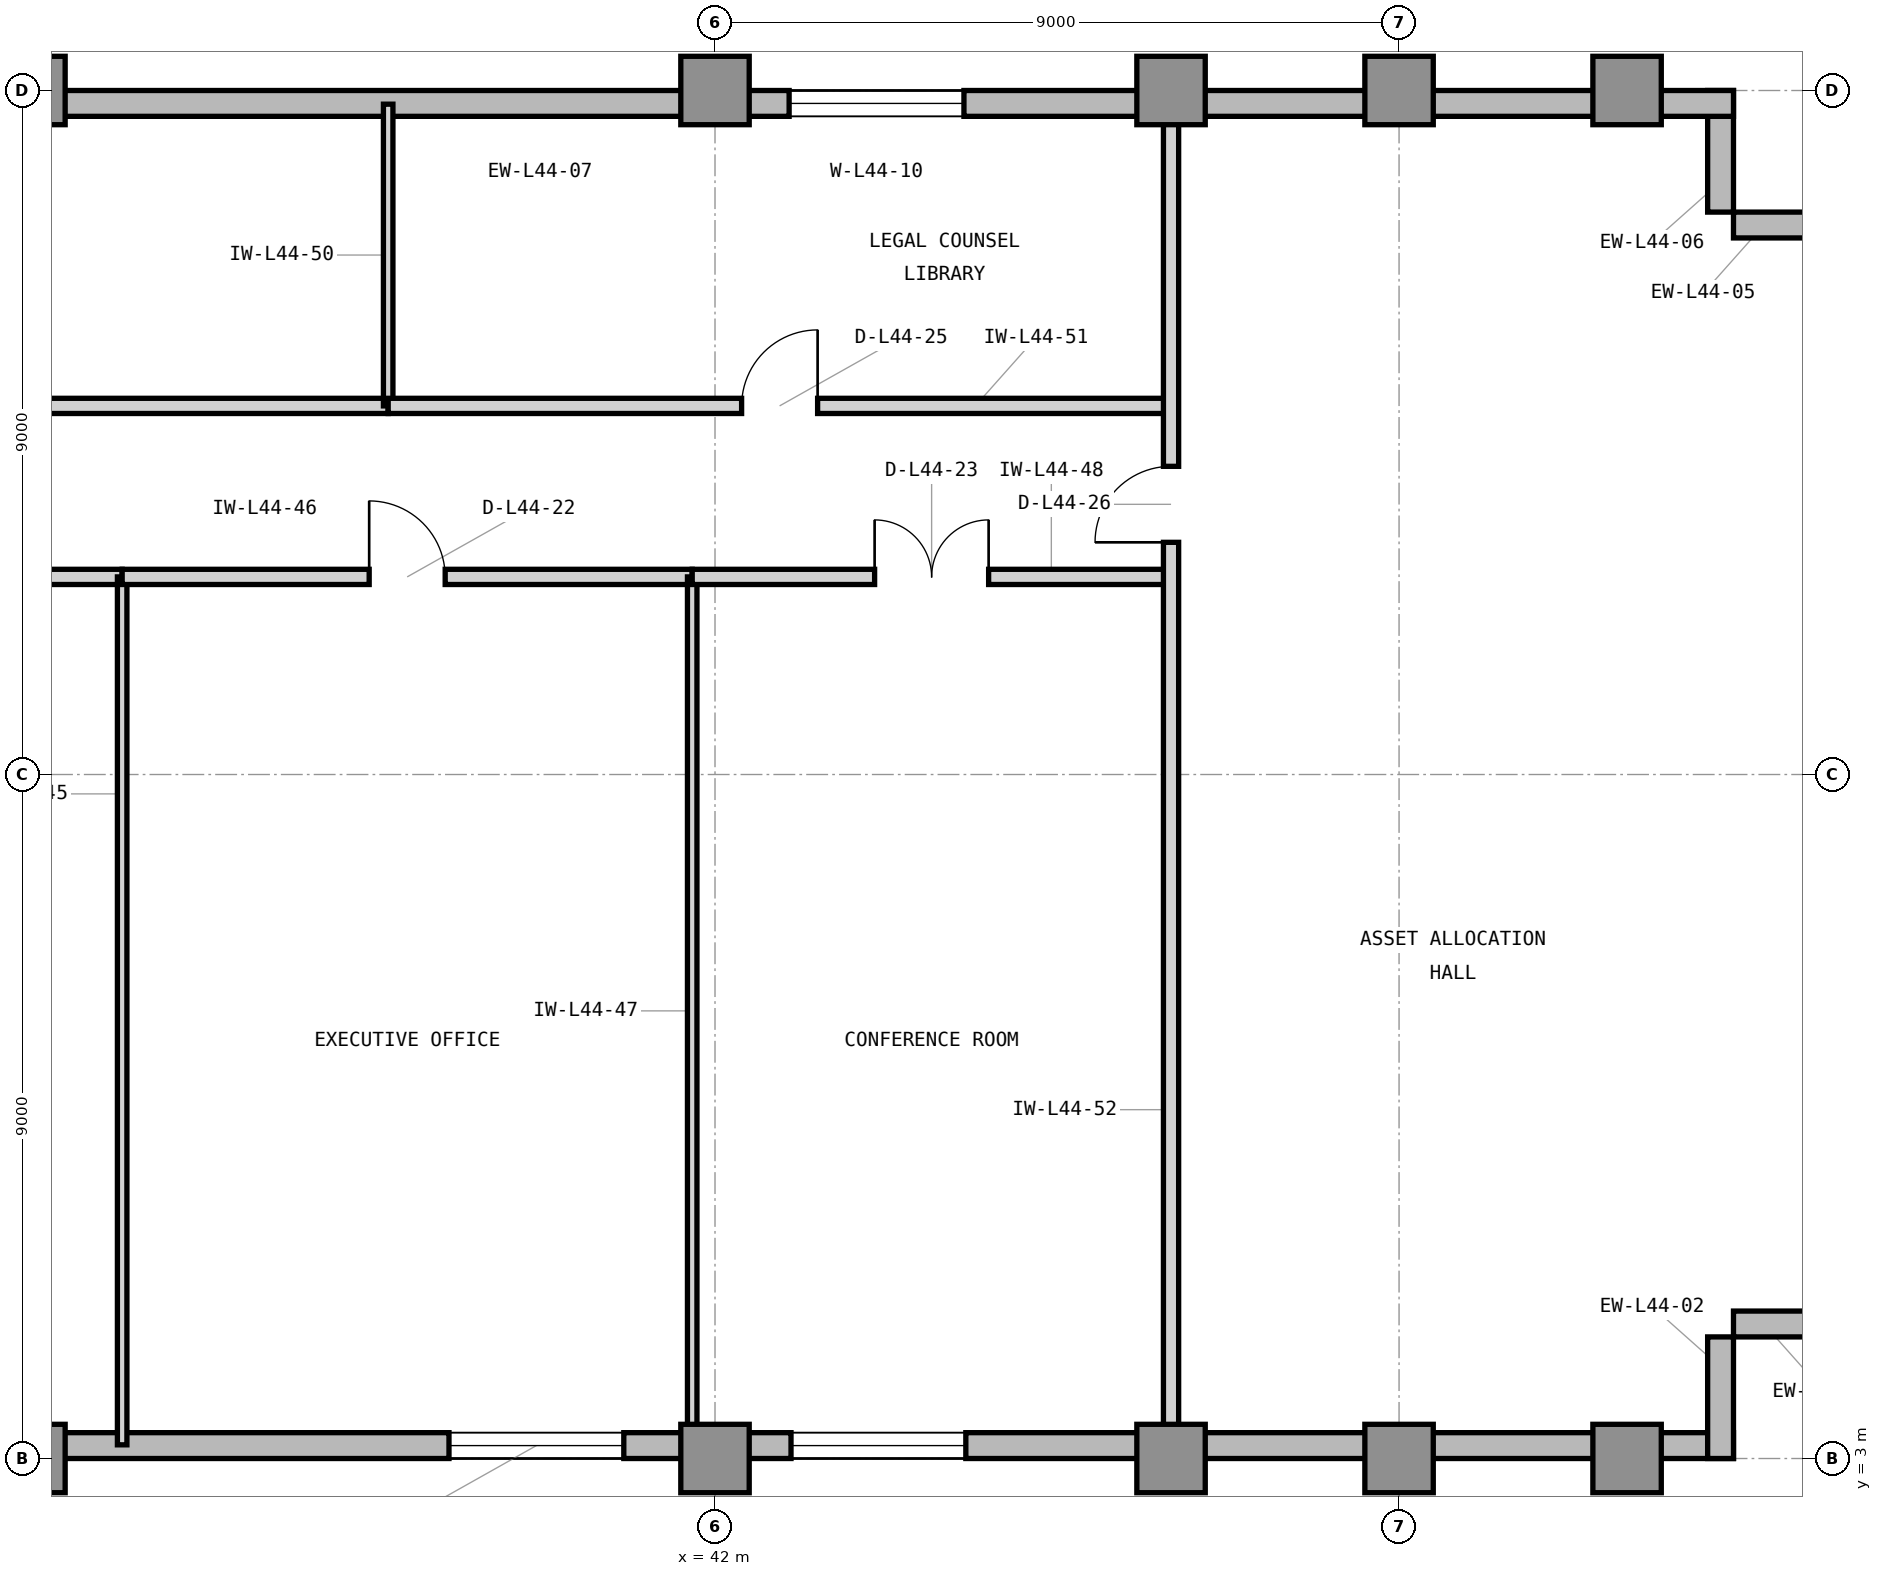
"""IFC4 building model, lengths in metres.
Left out: names, types, materials, properties, quantities, classifications, styles, units other than length and angle.
Written with IfcOpenShell. Run it as: python <this file> out.ifc"""

import sys

from ifc_helpers import new_model, si_unit, direction, frame, frame_2d, origin, origin_2d, place, context, subcontext, project, spatial, rectangle, extrude, element, fill, save


model = new_model("IFC4")
c1 = context("Model", 3, precision=1e-05, world=origin(), true_north=direction((0.0, 1.0)))
c2 = subcontext(c1, "Body", "Model", "MODEL_VIEW")
j1 = project(units=[si_unit("LENGTHUNIT", "METRE"), si_unit("PLANEANGLEUNIT", "RADIAN")], contexts=[c1])
p1 = place(None, origin())
s1 = spatial("IfcSite", under=j1, at=p1, CompositionType="ELEMENT")
p2 = place(p1, origin())
s2 = spatial("IfcBuilding", under=s1, at=p2, CompositionType="ELEMENT")
p3 = place(p2, frame((0.0, 0.0, 183.9)))
s3 = spatial("IfcBuildingStorey", under=s2, at=p3, CompositionType="ELEMENT", Elevation=183.9)
for number, where, z_axis, x_axis in (
    (1, (33.0, 3.0, 0.0), (0.0, 0.0, 1.0), (1.0, 0.0, 0.0)),
    (2, (33.0, 21.0, 0.0), (0.0, 0.0, 1.0), (1.0, 0.0, 0.0)),
    (3, (42.0, 3.0, 0.0), (0.0, 0.0, 1.0), (1.0, 0.0, 0.0)),
    (4, (42.0, 21.0, 0.0), (0.0, 0.0, 1.0), (1.0, 0.0, 0.0)),
    (5, (48.0, 3.0, 0.0), (0.0, 0.0, 1.0), (1.0, 0.0, 0.0)),
    (6, (48.0, 21.0, 0.0), (0.0, 0.0, 1.0), (1.0, 0.0, 0.0)),
    (7, (51.0, 3.0, 0.0), (0.0, 0.0, 1.0), (1.0, 0.0, 0.0)),
    (8, (51.0, 21.0, 0.0), (0.0, 0.0, 1.0), (1.0, 0.0, 0.0)),
    (9, (54.0, 3.0, 0.0), (0.0, 0.0, 1.0), (1.0, 0.0, 0.0)),
    (10, (54.0, 21.0, 0.0), (0.0, 0.0, 1.0), (1.0, 0.0, 0.0)),
):
    element("IfcColumn", number, at=place(p3, frame(where, z_axis=z_axis, x_axis=x_axis)), inside=s3, PredefinedType="COLUMN", context=c2, shape_type="SweptSolid", body=[
        extrude(rectangle(XDim=0.9, YDim=0.9, at=origin_2d()), origin(), (0.0, 0.0, 1.0), 3.9),
    ])
p4 = place(p3, frame((23.9, 3.17, 0.0), z_axis=(0.0, 0.0, 1.0), x_axis=(1.0, 0.0, 0.0)))
e11 = element("IfcWall", 11, at=p4, inside=s3, PredefinedType="STANDARD", context=c2, shape_type="SweptSolid", body=[
    extrude(rectangle(XDim=31.5, YDim=0.34, at=frame_2d((15.75, 0.0))), origin(), (0.0, 0.0, 1.0), 3.7),
])
p5 = place(p4, frame((5.6, 0.0, 0.9)))
e12 = element("IfcOpeningElement", 12, at=p5, cuts=e11, PredefinedType="OPENING", context=c2, shape_type="SweptSolid", body=[
    extrude(rectangle(XDim=2.3, YDim=2.2, at=frame_2d((1.15, 1.1))), frame((0.0, 0.18, 0.0), z_axis=(0.0, -1.0, 0.0), x_axis=(1.0, 0.0, 0.0)), (0.0, 0.0, 1.0), 0.36),
])
p6 = place(p4, frame((14.6, 0.0, 0.9)))
e13 = element("IfcOpeningElement", 13, at=p6, cuts=e11, PredefinedType="OPENING", context=c2, shape_type="SweptSolid", body=[
    extrude(rectangle(XDim=2.3, YDim=2.2, at=frame_2d((1.15, 1.1))), frame((0.0, 0.18, 0.0), z_axis=(0.0, -1.0, 0.0), x_axis=(1.0, 0.0, 0.0)), (0.0, 0.0, 1.0), 0.36),
])
p7 = place(p4, frame((19.1, 0.0, 0.9)))
e14 = element("IfcOpeningElement", 14, at=p7, cuts=e11, PredefinedType="OPENING", context=c2, shape_type="SweptSolid", body=[
    extrude(rectangle(XDim=2.3, YDim=2.2, at=frame_2d((1.15, 1.1))), frame((0.0, 0.18, 0.0), z_axis=(0.0, -1.0, 0.0), x_axis=(1.0, 0.0, 0.0)), (0.0, 0.0, 1.0), 0.36),
])
p8 = place(p4, frame((0.9, 0.0, 0.9)))
e15 = element("IfcOpeningElement", 15, at=p8, cuts=e11, PredefinedType="OPENING", context=c2, shape_type="SweptSolid", body=[
    extrude(rectangle(XDim=1.6, YDim=2.2, at=frame_2d((0.8, 1.1))), frame((0.0, 0.18, 0.0), z_axis=(0.0, -1.0, 0.0), x_axis=(1.0, 0.0, 0.0)), (0.0, 0.0, 1.0), 0.36),
])
for number, where, z_axis, x_axis in (
    (16, (55.23, 3.0, 0.0), (0.0, 0.0, 1.0), (0.0, 1.0, 0.0)),
    (17, (55.4, 4.77, 0.0), (0.0, 0.0, 1.0), (1.0, 0.0, 0.0)),
    (18, (57.0, 19.23, 0.0), (0.0, 0.0, 1.0), (-1.0, 0.0, 0.0)),
    (19, (55.23, 19.4, 0.0), (0.0, 0.0, 1.0), (0.0, 1.0, 0.0)),
):
    element("IfcWall", number, at=place(p3, frame(where, z_axis=z_axis, x_axis=x_axis)), inside=s3, PredefinedType="STANDARD", context=c2, shape_type="SweptSolid", body=[
        extrude(rectangle(XDim=1.6, YDim=0.34, at=frame_2d((0.8, 0.0))), origin(), (0.0, 0.0, 1.0), 3.7),
    ])
p9 = place(p3, frame((55.4, 20.83, 0.0), z_axis=(0.0, 0.0, 1.0), x_axis=(-1.0, 0.0, 0.0)))
e20 = element("IfcWall", 20, at=p9, inside=s3, PredefinedType="STANDARD", context=c2, shape_type="SweptSolid", body=[
    extrude(rectangle(XDim=31.4, YDim=0.34, at=frame_2d((15.7, 0.0))), origin(), (0.0, 0.0, 1.0), 3.7),
])
p10 = place(p9, frame((29.046, 0.0, 0.9)))
e21 = element("IfcOpeningElement", 21, at=p10, cuts=e20, PredefinedType="OPENING", context=c2, shape_type="SweptSolid", body=[
    extrude(rectangle(XDim=1.6, YDim=2.2, at=frame_2d((0.8, 1.1))), frame((0.0, 0.18, 0.0), z_axis=(0.0, -1.0, 0.0), x_axis=(1.0, 0.0, 0.0)), (0.0, 0.0, 1.0), 0.36),
])
p11 = place(p9, frame((10.125, 0.0, 0.9)))
e22 = element("IfcOpeningElement", 22, at=p11, cuts=e20, PredefinedType="OPENING", context=c2, shape_type="SweptSolid", body=[
    extrude(rectangle(XDim=2.3, YDim=2.2, at=frame_2d((1.15, 1.1))), frame((0.0, 0.18, 0.0), z_axis=(0.0, -1.0, 0.0), x_axis=(1.0, 0.0, 0.0)), (0.0, 0.0, 1.0), 0.36),
])
p12 = place(p3, frame((26.7, 14.6, 0.0), z_axis=(0.0, 0.0, 1.0), x_axis=(1.0, 0.0, 0.0)))
e23 = element("IfcWall", 23, at=p12, inside=s3, PredefinedType="PARTITIONING", context=c2, shape_type="SweptSolid", body=[
    extrude(rectangle(XDim=7.5, YDim=0.2, at=frame_2d((3.75, 0.0))), origin(), (0.0, 0.0, 1.0), 3.69),
])
p13 = place(p12, frame((2.75, 0.0, 0.0)))
e24 = element("IfcOpeningElement", 24, at=p13, cuts=e23, PredefinedType="OPENING", context=c2, shape_type="SweptSolid", body=[
    extrude(rectangle(XDim=2.0, YDim=2.5, at=frame_2d((1.0, 1.25))), frame((0.0, 0.11, 0.0), z_axis=(0.0, -1.0, 0.0), x_axis=(1.0, 0.0, 0.0)), (0.0, 0.0, 1.0), 0.22),
])
p14 = place(p3, frame((34.2, 3.18, 0.0), z_axis=(0.0, 0.0, 1.0), x_axis=(0.0, 1.0, 0.0)))
e25 = element("IfcWall", 25, at=p14, inside=s3, PredefinedType="PARTITIONING", context=c2, shape_type="SweptSolid", body=[
    extrude(rectangle(XDim=11.42, YDim=0.125, at=frame_2d((5.71, 0.0))), origin(), (0.0, 0.0, 1.0), 3.69),
])
p15 = place(p3, frame((34.2, 14.6, 0.0), z_axis=(0.0, 0.0, 1.0), x_axis=(1.0, 0.0, 0.0)))
e26 = element("IfcWall", 26, at=p15, inside=s3, PredefinedType="PARTITIONING", context=c2, shape_type="SweptSolid", body=[
    extrude(rectangle(XDim=7.5, YDim=0.2, at=frame_2d((3.75, 0.0))), origin(), (0.0, 0.0, 1.0), 3.69),
])
p16 = place(p15, frame((3.25, 0.0, 0.0)))
e27 = element("IfcOpeningElement", 27, at=p16, cuts=e26, PredefinedType="OPENING", context=c2, shape_type="SweptSolid", body=[
    extrude(rectangle(XDim=1.0, YDim=2.15, at=frame_2d((0.5, 1.075))), frame((0.0, 0.11, 0.0), z_axis=(0.0, -1.0, 0.0), x_axis=(1.0, 0.0, 0.0)), (0.0, 0.0, 1.0), 0.22),
])
p17 = place(p3, frame((41.7, 3.18, 0.0), z_axis=(0.0, 0.0, 1.0), x_axis=(0.0, 1.0, 0.0)))
e28 = element("IfcWall", 28, at=p17, inside=s3, PredefinedType="PARTITIONING", context=c2, shape_type="SweptSolid", body=[
    extrude(rectangle(XDim=11.42, YDim=0.125, at=frame_2d((5.71, 0.0))), origin(), (0.0, 0.0, 1.0), 3.69),
])
p18 = place(p3, frame((41.7, 14.6, 0.0), z_axis=(0.0, 0.0, 1.0), x_axis=(1.0, 0.0, 0.0)))
e29 = element("IfcWall", 29, at=p18, inside=s3, PredefinedType="PARTITIONING", context=c2, shape_type="SweptSolid", body=[
    extrude(rectangle(XDim=6.3, YDim=0.2, at=frame_2d((3.15, 0.0))), origin(), (0.0, 0.0, 1.0), 3.69),
])
p19 = place(p18, frame((2.4, 0.0, 0.0)))
e30 = element("IfcOpeningElement", 30, at=p19, cuts=e29, PredefinedType="OPENING", context=c2, shape_type="SweptSolid", body=[
    extrude(rectangle(XDim=1.5, YDim=2.3, at=frame_2d((0.75, 1.15))), frame((0.0, 0.11, 0.0), z_axis=(0.0, -1.0, 0.0), x_axis=(1.0, 0.0, 0.0)), (0.0, 0.0, 1.0), 0.22),
])
p20 = place(p3, frame((26.7, 16.85, 0.0), z_axis=(0.0, 0.0, 1.0), x_axis=(1.0, 0.0, 0.0)))
e31 = element("IfcWall", 31, at=p20, inside=s3, PredefinedType="PARTITIONING", context=c2, shape_type="SweptSolid", body=[
    extrude(rectangle(XDim=11.0, YDim=0.2, at=frame_2d((5.5, 0.0))), origin(), (0.0, 0.0, 1.0), 3.69),
])
p21 = place(p20, frame((4.75, 0.0, 0.0)))
e32 = element("IfcOpeningElement", 32, at=p21, cuts=e31, PredefinedType="OPENING", context=c2, shape_type="SweptSolid", body=[
    extrude(rectangle(XDim=1.5, YDim=2.3, at=frame_2d((0.75, 1.15))), frame((0.0, 0.11, 0.0), z_axis=(0.0, -1.0, 0.0), x_axis=(1.0, 0.0, 0.0)), (0.0, 0.0, 1.0), 0.22),
])
p22 = place(p3, frame((37.7, 16.85, 0.0), z_axis=(0.0, 0.0, 1.0), x_axis=(0.0, 1.0, 0.0)))
e33 = element("IfcWall", 33, at=p22, inside=s3, PredefinedType="PARTITIONING", context=c2, shape_type="SweptSolid", body=[
    extrude(rectangle(XDim=3.97, YDim=0.125, at=frame_2d((1.985, 0.0))), origin(), (0.0, 0.0, 1.0), 3.69),
])
p23 = place(p3, frame((37.7, 16.85, 0.0), z_axis=(0.0, 0.0, 1.0), x_axis=(1.0, 0.0, 0.0)))
e34 = element("IfcWall", 34, at=p23, inside=s3, PredefinedType="PARTITIONING", context=c2, shape_type="SweptSolid", body=[
    extrude(rectangle(XDim=10.3, YDim=0.2, at=frame_2d((5.15, 0.0))), origin(), (0.0, 0.0, 1.0), 3.69),
])
p24 = place(p23, frame((4.65, 0.0, 0.0)))
e35 = element("IfcOpeningElement", 35, at=p24, cuts=e34, PredefinedType="OPENING", context=c2, shape_type="SweptSolid", body=[
    extrude(rectangle(XDim=1.0, YDim=2.15, at=frame_2d((0.5, 1.075))), frame((0.0, 0.11, 0.0), z_axis=(0.0, -1.0, 0.0), x_axis=(1.0, 0.0, 0.0)), (0.0, 0.0, 1.0), 0.22),
])
p25 = place(p3, frame((48.0, 3.18, 0.0), z_axis=(0.0, 0.0, 1.0), x_axis=(0.0, 1.0, 0.0)))
e36 = element("IfcWall", 36, at=p25, inside=s3, PredefinedType="PARTITIONING", context=c2, shape_type="SweptSolid", body=[
    extrude(rectangle(XDim=17.64, YDim=0.2, at=frame_2d((8.82, 0.0))), origin(), (0.0, 0.0, 1.0), 3.073),
])
p26 = place(p25, frame((11.875, 0.0, 0.0)))
e37 = element("IfcOpeningElement", 37, at=p26, cuts=e36, PredefinedType="OPENING", context=c2, shape_type="SweptSolid", body=[
    extrude(rectangle(XDim=1.0, YDim=2.15, at=frame_2d((0.5, 1.075))), frame((0.0, 0.11, 0.0), z_axis=(0.0, -1.0, 0.0), x_axis=(1.0, 0.0, 0.0)), (0.0, 0.0, 1.0), 0.22),
])
p27 = place(p6, origin())
e38 = element("IfcWindow", 38, at=p27, inside=s3, PartitioningType="SINGLE_PANEL", PredefinedType="WINDOW", context=c2, shape_type="SweptSolid", body=[
    extrude(rectangle(XDim=2.3, YDim=2.2, at=frame_2d((1.15, 1.1))), frame((0.0, 0.11, 0.0), z_axis=(0.0, -1.0, 0.0), x_axis=(1.0, 0.0, 0.0)), (0.0, 0.0, 1.0), 0.06),
])
fill(e13, e38)
p28 = place(p7, origin())
e39 = element("IfcWindow", 39, at=p28, inside=s3, PartitioningType="SINGLE_PANEL", PredefinedType="WINDOW", context=c2, shape_type="SweptSolid", body=[
    extrude(rectangle(XDim=2.3, YDim=2.2, at=frame_2d((1.15, 1.1))), frame((0.0, 0.11, 0.0), z_axis=(0.0, -1.0, 0.0), x_axis=(1.0, 0.0, 0.0)), (0.0, 0.0, 1.0), 0.06),
])
fill(e14, e39)
p29 = place(p16, origin())
e40 = element("IfcDoor", 40, at=p29, inside=s3, OperationType="SINGLE_SWING_LEFT", PredefinedType="DOOR", context=c2, shape_type="SweptSolid", body=[
    extrude(rectangle(XDim=1.0, YDim=2.15, at=frame_2d((0.5, 1.075))), frame((0.0, 0.025, 0.0), z_axis=(0.0, -1.0, 0.0), x_axis=(1.0, 0.0, 0.0)), (0.0, 0.0, 1.0), 0.05),
])
fill(e27, e40)
p30 = place(p19, origin())
e41 = element("IfcDoor", 41, at=p30, inside=s3, OperationType="DOUBLE_DOOR_SINGLE_SWING", PredefinedType="DOOR", context=c2, shape_type="SweptSolid", body=[
    extrude(rectangle(XDim=1.5, YDim=2.3, at=frame_2d((0.75, 1.15))), frame((0.0, 0.025, 0.0), z_axis=(0.0, -1.0, 0.0), x_axis=(1.0, 0.0, 0.0)), (0.0, 0.0, 1.0), 0.05),
])
fill(e30, e41)
p31 = place(p24, origin())
e42 = element("IfcDoor", 42, at=p31, inside=s3, OperationType="SINGLE_SWING_RIGHT", PredefinedType="DOOR", context=c2, shape_type="SweptSolid", body=[
    extrude(rectangle(XDim=1.0, YDim=2.15, at=frame_2d((0.5, 1.075))), frame((0.0, 0.025, 0.0), z_axis=(0.0, -1.0, 0.0), x_axis=(1.0, 0.0, 0.0)), (0.0, 0.0, 1.0), 0.05),
])
fill(e35, e42)
p32 = place(p26, origin())
e43 = element("IfcDoor", 43, at=p32, inside=s3, OperationType="SINGLE_SWING_LEFT", PredefinedType="DOOR", context=c2, shape_type="SweptSolid", body=[
    extrude(rectangle(XDim=1.0, YDim=2.15, at=frame_2d((0.5, 1.075))), frame((0.0, 0.025, 0.0), z_axis=(0.0, -1.0, 0.0), x_axis=(1.0, 0.0, 0.0)), (0.0, 0.0, 1.0), 0.05),
])
fill(e37, e43)
p33 = place(p11, origin())
e44 = element("IfcWindow", 44, at=p33, inside=s3, PartitioningType="SINGLE_PANEL", PredefinedType="WINDOW", context=c2, shape_type="SweptSolid", body=[
    extrude(rectangle(XDim=2.3, YDim=2.2, at=frame_2d((1.15, 1.1))), frame((0.0, 0.11, 0.0), z_axis=(0.0, -1.0, 0.0), x_axis=(1.0, 0.0, 0.0)), (0.0, 0.0, 1.0), 0.06),
])
fill(e22, e44)
save(model, sys.argv[1])
